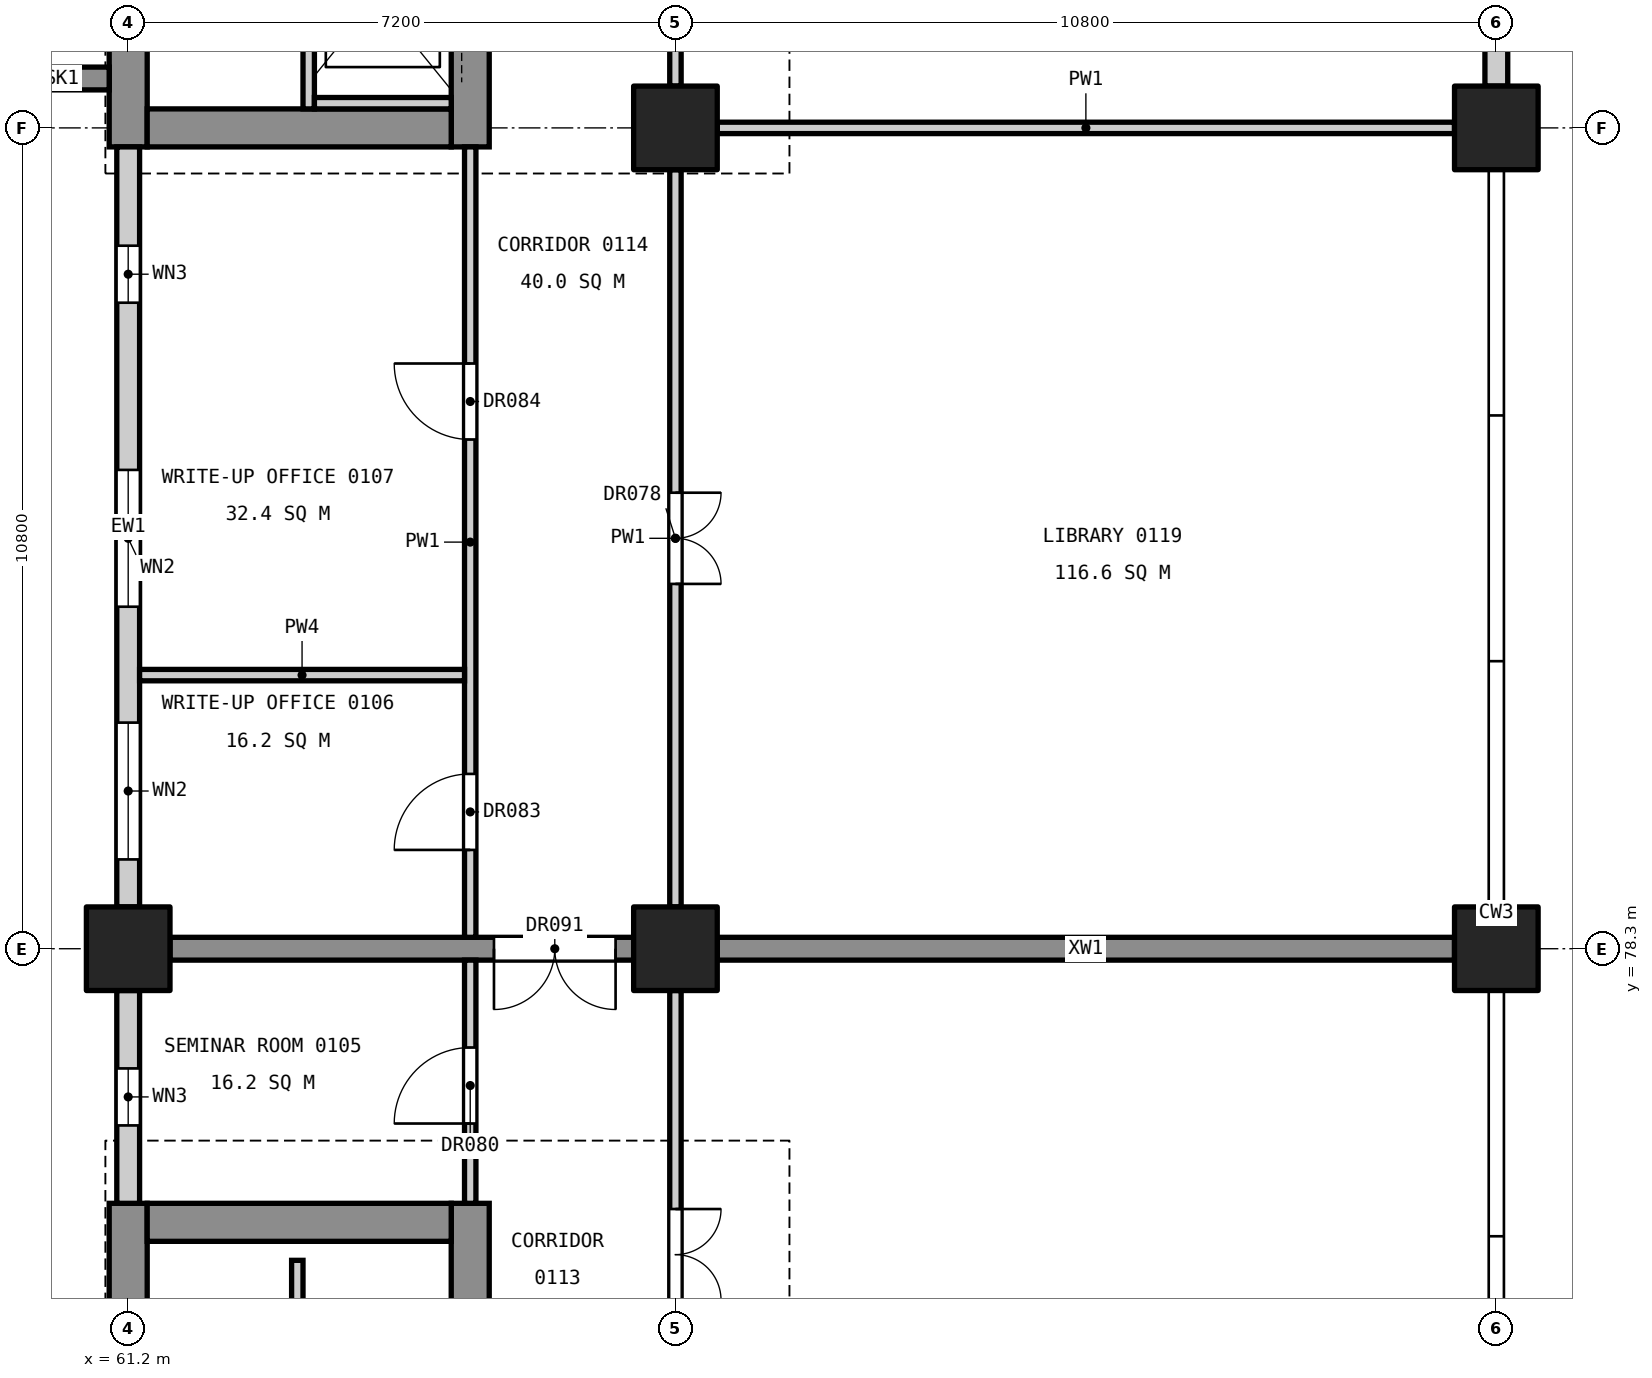
"""IFC4 building model, lengths in metres.
Left out: names, types, materials, properties, quantities, classifications, styles, units other than length and angle.
Written with IfcOpenShell. Run it as: python <this file> out.ifc"""

import sys

from ifc_helpers import new_model, si_unit, direction, frame, frame_2d, origin, origin_2d, place, context, subcontext, project, spatial, rectangle, extrude, element, fill, save


model = new_model("IFC4")
c1 = context("Model", 3, precision=1e-05, world=origin(), true_north=direction((0.0, 1.0)))
c2 = subcontext(c1, "Body", "Model", "MODEL_VIEW")
j1 = project(units=[si_unit("LENGTHUNIT", "METRE"), si_unit("PLANEANGLEUNIT", "RADIAN")], contexts=[c1])
p1 = place(None, origin())
s1 = spatial("IfcSite", under=j1, at=p1, CompositionType="ELEMENT")
p2 = place(p1, origin())
s2 = spatial("IfcBuilding", under=s1, at=p2, CompositionType="ELEMENT")
p3 = place(p2, frame((0.0, 0.0, 6.0)))
s3 = spatial("IfcBuildingStorey", under=s2, at=p3, CompositionType="ELEMENT", Elevation=6.0)
for number, where, z_axis, x_axis in (
    (1, (61.2, 78.3, 0.0), (0.0, 0.0, 1.0), (1.0, 0.0, 0.0)),
    (2, (68.4, 78.3, 0.0), (0.0, 0.0, 1.0), (1.0, 0.0, 0.0)),
    (3, (68.4, 89.1, 0.0), (0.0, 0.0, 1.0), (1.0, 0.0, 0.0)),
    (4, (79.2, 78.3, 0.0), (0.0, 0.0, 1.0), (1.0, 0.0, 0.0)),
    (5, (79.2, 89.1, 0.0), (0.0, 0.0, 1.0), (1.0, 0.0, 0.0)),
):
    element("IfcColumn", number, at=place(p3, frame(where, z_axis=z_axis, x_axis=x_axis)), inside=s3, PredefinedType="COLUMN", context=c2, shape_type="SweptSolid", body=[
        extrude(rectangle(XDim=1.1, YDim=1.1, at=origin_2d()), origin(), (0.0, 0.0, 1.0), 5.4),
    ])
p4 = place(p3, frame((61.2, 60.05, 0.0), z_axis=(0.0, 0.0, 1.0), x_axis=(0.0, 1.0, 0.0)))
e6 = element("IfcWall", 6, at=p4, inside=s3, PredefinedType="SHEAR", context=c2, shape_type="SweptSolid", body=[
    extrude(rectangle(XDim=14.9, YDim=0.5, at=frame_2d((7.45, 0.0))), origin(), (0.0, 0.0, 1.0), 5.1),
])
p5 = place(p4, frame((6.3, 0.0, 3.4)))
e7 = element("IfcOpeningElement", 7, at=p5, cuts=e6, PredefinedType="OPENING", context=c2, shape_type="SweptSolid", body=[
    extrude(rectangle(XDim=1.2, YDim=0.9, at=frame_2d((0.6, 0.45))), frame((0.0, 0.26, 0.0), z_axis=(0.0, -1.0, 0.0), x_axis=(1.0, 0.0, 0.0)), (0.0, 0.0, 1.0), 0.52),
])
p6 = place(p3, frame((65.7, 60.05, 0.0), z_axis=(0.0, 0.0, 1.0), x_axis=(0.0, 1.0, 0.0)))
e8 = element("IfcWall", 8, at=p6, inside=s3, PredefinedType="SHEAR", context=c2, shape_type="SweptSolid", body=[
    extrude(rectangle(XDim=14.9, YDim=0.5, at=frame_2d((7.45, 0.0))), origin(), (0.0, 0.0, 1.0), 5.1),
])
p7 = place(p6, frame((0.55, 0.0, 0.0)))
e9 = element("IfcOpeningElement", 9, at=p7, cuts=e8, PredefinedType="OPENING", context=c2, shape_type="SweptSolid", body=[
    extrude(rectangle(XDim=1.4, YDim=2.1, at=frame_2d((0.7, 1.05))), frame((0.0, 0.26, 0.0), z_axis=(0.0, -1.0, 0.0), x_axis=(1.0, 0.0, 0.0)), (0.0, 0.0, 1.0), 0.52),
])
p8 = place(p6, frame((8.85, 0.0, 0.0)))
e10 = element("IfcOpeningElement", 10, at=p8, cuts=e8, PredefinedType="OPENING", context=c2, shape_type="SweptSolid", body=[
    extrude(rectangle(XDim=1.1, YDim=2.1, at=frame_2d((0.55, 1.05))), frame((0.0, 0.26, 0.0), z_axis=(0.0, -1.0, 0.0), x_axis=(1.0, 0.0, 0.0)), (0.0, 0.0, 1.0), 0.52),
])
p9 = place(p6, frame((11.4, 0.0, 0.0)))
e11 = element("IfcOpeningElement", 11, at=p9, cuts=e8, PredefinedType="OPENING", context=c2, shape_type="SweptSolid", body=[
    extrude(rectangle(XDim=1.1, YDim=2.1, at=frame_2d((0.55, 1.05))), frame((0.0, 0.26, 0.0), z_axis=(0.0, -1.0, 0.0), x_axis=(1.0, 0.0, 0.0)), (0.0, 0.0, 1.0), 0.52),
])
p10 = place(p3, frame((61.45, 74.7, 0.0), z_axis=(0.0, 0.0, 1.0), x_axis=(1.0, 0.0, 0.0)))
e12 = element("IfcWall", 12, at=p10, inside=s3, PredefinedType="SHEAR", context=c2, shape_type="SweptSolid", body=[
    extrude(rectangle(XDim=4.0, YDim=0.5, at=frame_2d((2.0, 0.0))), origin(), (0.0, 0.0, 1.0), 5.1),
])
p11 = place(p3, frame((61.2, 88.85, 0.0), z_axis=(0.0, 0.0, 1.0), x_axis=(0.0, 1.0, 0.0)))
e13 = element("IfcWall", 13, at=p11, inside=s3, PredefinedType="SHEAR", context=c2, shape_type="SweptSolid", body=[
    extrude(rectangle(XDim=11.3, YDim=0.5, at=frame_2d((5.65, 0.0))), origin(), (0.0, 0.0, 1.0), 5.1),
])
p12 = place(p11, frame((3.8, 0.0, 3.4)))
e14 = element("IfcOpeningElement", 14, at=p12, cuts=e13, PredefinedType="OPENING", context=c2, shape_type="SweptSolid", body=[
    extrude(rectangle(XDim=1.2, YDim=0.9, at=frame_2d((0.6, 0.45))), frame((0.0, 0.26, 0.0), z_axis=(0.0, -1.0, 0.0), x_axis=(1.0, 0.0, 0.0)), (0.0, 0.0, 1.0), 0.52),
])
p13 = place(p3, frame((65.7, 88.85, 0.0), z_axis=(0.0, 0.0, 1.0), x_axis=(0.0, 1.0, 0.0)))
e15 = element("IfcWall", 15, at=p13, inside=s3, PredefinedType="SHEAR", context=c2, shape_type="SweptSolid", body=[
    extrude(rectangle(XDim=11.3, YDim=0.5, at=frame_2d((5.65, 0.0))), origin(), (0.0, 0.0, 1.0), 5.1),
])
p14 = place(p13, frame((9.35, 0.0, 0.0)))
e16 = element("IfcOpeningElement", 16, at=p14, cuts=e15, PredefinedType="OPENING", context=c2, shape_type="SweptSolid", body=[
    extrude(rectangle(XDim=1.4, YDim=2.1, at=frame_2d((0.7, 1.05))), frame((0.0, 0.26, 0.0), z_axis=(0.0, -1.0, 0.0), x_axis=(1.0, 0.0, 0.0)), (0.0, 0.0, 1.0), 0.52),
])
p15 = place(p13, frame((1.4, 0.0, 0.0)))
e17 = element("IfcOpeningElement", 17, at=p15, cuts=e15, PredefinedType="OPENING", context=c2, shape_type="SweptSolid", body=[
    extrude(rectangle(XDim=1.1, YDim=2.1, at=frame_2d((0.55, 1.05))), frame((0.0, 0.26, 0.0), z_axis=(0.0, -1.0, 0.0), x_axis=(1.0, 0.0, 0.0)), (0.0, 0.0, 1.0), 0.52),
])
p16 = place(p3, frame((61.45, 89.1, 0.0), z_axis=(0.0, 0.0, 1.0), x_axis=(1.0, 0.0, 0.0)))
e18 = element("IfcWall", 18, at=p16, inside=s3, PredefinedType="SHEAR", context=c2, shape_type="SweptSolid", body=[
    extrude(rectangle(XDim=4.0, YDim=0.5, at=frame_2d((2.0, 0.0))), origin(), (0.0, 0.0, 1.0), 5.1),
])
p17 = place(p3, frame((60.95, 89.75, 0.0), z_axis=(0.0, 0.0, 1.0), x_axis=(-1.0, 0.0, 0.0)))
e19 = element("IfcWall", 19, at=p17, inside=s3, PredefinedType="SHEAR", context=c2, shape_type="SweptSolid", body=[
    extrude(rectangle(XDim=1.25, YDim=0.3, at=frame_2d((0.625, 0.0))), origin(), (0.0, 0.0, 1.0), 5.4),
])
p18 = place(p3, frame((61.75, 78.3, 0.0), z_axis=(0.0, 0.0, 1.0), x_axis=(1.0, 0.0, 0.0)))
e20 = element("IfcWall", 20, at=p18, inside=s3, PredefinedType="SHEAR", context=c2, shape_type="SweptSolid", body=[
    extrude(rectangle(XDim=6.1, YDim=0.3, at=frame_2d((3.05, 0.0))), origin(), (0.0, 0.0, 1.0), 5.1),
])
p19 = place(p18, frame((4.262, 0.0, 0.0)))
e21 = element("IfcOpeningElement", 21, at=p19, cuts=e20, PredefinedType="OPENING", context=c2, shape_type="SweptSolid", body=[
    extrude(rectangle(XDim=1.6, YDim=2.1, at=frame_2d((0.8, 1.05))), frame((0.0, 0.16, 0.0), z_axis=(0.0, -1.0, 0.0), x_axis=(1.0, 0.0, 0.0)), (0.0, 0.0, 1.0), 0.32),
])
p20 = place(p3, frame((68.95, 78.3, 0.0), z_axis=(0.0, 0.0, 1.0), x_axis=(1.0, 0.0, 0.0)))
e22 = element("IfcWall", 22, at=p20, inside=s3, PredefinedType="SHEAR", context=c2, shape_type="SweptSolid", body=[
    extrude(rectangle(XDim=9.7, YDim=0.3, at=frame_2d((4.85, 0.0))), origin(), (0.0, 0.0, 1.0), 5.1),
])
p21 = place(p3, frame((63.575, 92.0, 0.0), z_axis=(0.0, 0.0, 1.0), x_axis=(0.0, -1.0, 0.0)))
e23 = element("IfcWall", 23, at=p21, inside=s3, PredefinedType="SOLIDWALL", context=c2, shape_type="SweptSolid", body=[
    extrude(rectangle(XDim=2.65, YDim=0.15, at=frame_2d((1.325, 0.0))), origin(), (0.0, 0.0, 1.0), 5.4),
])
p22 = place(p3, frame((63.65, 89.425, 0.0), z_axis=(0.0, 0.0, 1.0), x_axis=(1.0, 0.0, 0.0)))
e24 = element("IfcWall", 24, at=p22, inside=s3, PredefinedType="SOLIDWALL", context=c2, shape_type="SweptSolid", body=[
    extrude(rectangle(XDim=1.8, YDim=0.15, at=frame_2d((0.9, 0.0))), origin(), (0.0, 0.0, 1.0), 5.4),
])
p23 = place(p3, frame((63.425, 73.3, 0.0), z_axis=(0.0, 0.0, 1.0), x_axis=(0.0, 1.0, 0.0)))
e25 = element("IfcWall", 25, at=p23, inside=s3, PredefinedType="SOLIDWALL", context=c2, shape_type="SweptSolid", body=[
    extrude(rectangle(XDim=0.9, YDim=0.15, at=frame_2d((0.45, 0.0))), origin(), (0.0, 0.0, 1.0), 5.4),
])
p24 = place(p3, frame((61.2, 74.95, 0.0), z_axis=(0.0, 0.0, 1.0), x_axis=(0.0, 1.0, 0.0)))
e26 = element("IfcWall", 26, at=p24, inside=s3, PredefinedType="STANDARD", context=c2, shape_type="SweptSolid", body=[
    extrude(rectangle(XDim=2.8, YDim=0.3, at=frame_2d((1.4, 0.0))), origin(), (0.0, 0.0, 1.0), 4.1),
])
p25 = place(p24, frame((1.025, 0.0, 0.8)))
e27 = element("IfcOpeningElement", 27, at=p25, cuts=e26, PredefinedType="OPENING", context=c2, shape_type="SweptSolid", body=[
    extrude(rectangle(XDim=0.75, YDim=1.2, at=frame_2d((0.375, 0.6))), frame((0.0, 0.16, 0.0), z_axis=(0.0, -1.0, 0.0), x_axis=(1.0, 0.0, 0.0)), (0.0, 0.0, 1.0), 0.32),
])
p26 = place(p3, frame((61.2, 78.85, 0.0), z_axis=(0.0, 0.0, 1.0), x_axis=(0.0, 1.0, 0.0)))
e28 = element("IfcWall", 28, at=p26, inside=s3, PredefinedType="STANDARD", context=c2, shape_type="SweptSolid", body=[
    extrude(rectangle(XDim=10.0, YDim=0.3, at=frame_2d((5.0, 0.0))), origin(), (0.0, 0.0, 1.0), 4.1),
])
p27 = place(p26, frame((0.625, 0.0, 0.9)))
e29 = element("IfcOpeningElement", 29, at=p27, cuts=e28, PredefinedType="OPENING", context=c2, shape_type="SweptSolid", body=[
    extrude(rectangle(XDim=1.8, YDim=3.0, at=frame_2d((0.9, 1.5))), frame((0.0, 0.16, 0.0), z_axis=(0.0, -1.0, 0.0), x_axis=(1.0, 0.0, 0.0)), (0.0, 0.0, 1.0), 0.32),
])
p28 = place(p26, frame((3.95, 0.0, 0.9)))
e30 = element("IfcOpeningElement", 30, at=p28, cuts=e28, PredefinedType="OPENING", context=c2, shape_type="SweptSolid", body=[
    extrude(rectangle(XDim=1.8, YDim=3.0, at=frame_2d((0.9, 1.5))), frame((0.0, 0.16, 0.0), z_axis=(0.0, -1.0, 0.0), x_axis=(1.0, 0.0, 0.0)), (0.0, 0.0, 1.0), 0.32),
])
p29 = place(p26, frame((7.95, 0.0, 0.8)))
e31 = element("IfcOpeningElement", 31, at=p29, cuts=e28, PredefinedType="OPENING", context=c2, shape_type="SweptSolid", body=[
    extrude(rectangle(XDim=0.75, YDim=1.2, at=frame_2d((0.375, 0.6))), frame((0.0, 0.16, 0.0), z_axis=(0.0, -1.0, 0.0), x_axis=(1.0, 0.0, 0.0)), (0.0, 0.0, 1.0), 0.32),
])
p30 = place(p3, frame((79.2, 89.65, 0.0), z_axis=(0.0, 0.0, 1.0), x_axis=(0.0, 1.0, 0.0)))
e32 = element("IfcWall", 32, at=p30, inside=s3, PredefinedType="STANDARD", context=c2, shape_type="SweptSolid", body=[
    extrude(rectangle(XDim=9.7, YDim=0.3, at=frame_2d((4.85, 0.0))), origin(), (0.0, 0.0, 1.0), 4.0),
])
p31 = place(p3, frame((65.7, 74.95, 0.0), z_axis=(0.0, 0.0, 1.0), x_axis=(0.0, 1.0, 0.0)))
e33 = element("IfcWall", 33, at=p31, inside=s3, PredefinedType="PARTITIONING", context=c2, shape_type="SweptSolid", body=[
    extrude(rectangle(XDim=3.2, YDim=0.15, at=frame_2d((1.6, 0.0))), origin(), (0.0, 0.0, 1.0), 4.0),
])
p32 = place(p31, frame((1.05, 0.0, 0.0)))
e34 = element("IfcOpeningElement", 34, at=p32, cuts=e33, PredefinedType="OPENING", context=c2, shape_type="SweptSolid", body=[
    extrude(rectangle(XDim=1.0, YDim=2.1, at=frame_2d((0.5, 1.05))), frame((0.0, 0.085, 0.0), z_axis=(0.0, -1.0, 0.0), x_axis=(1.0, 0.0, 0.0)), (0.0, 0.0, 1.0), 0.17),
])
p33 = place(p3, frame((65.7, 78.45, 0.0), z_axis=(0.0, 0.0, 1.0), x_axis=(0.0, 1.0, 0.0)))
e35 = element("IfcWall", 35, at=p33, inside=s3, PredefinedType="PARTITIONING", context=c2, shape_type="SweptSolid", body=[
    extrude(rectangle(XDim=10.4, YDim=0.15, at=frame_2d((5.2, 0.0))), origin(), (0.0, 0.0, 1.0), 4.0),
])
p34 = place(p33, frame((1.15, 0.0, 0.0)))
e36 = element("IfcOpeningElement", 36, at=p34, cuts=e35, PredefinedType="OPENING", context=c2, shape_type="SweptSolid", body=[
    extrude(rectangle(XDim=1.0, YDim=2.1, at=frame_2d((0.5, 1.05))), frame((0.0, 0.085, 0.0), z_axis=(0.0, -1.0, 0.0), x_axis=(1.0, 0.0, 0.0)), (0.0, 0.0, 1.0), 0.17),
])
p35 = place(p33, frame((6.55, 0.0, 0.0)))
e37 = element("IfcOpeningElement", 37, at=p35, cuts=e35, PredefinedType="OPENING", context=c2, shape_type="SweptSolid", body=[
    extrude(rectangle(XDim=1.0, YDim=2.1, at=frame_2d((0.5, 1.05))), frame((0.0, 0.085, 0.0), z_axis=(0.0, -1.0, 0.0), x_axis=(1.0, 0.0, 0.0)), (0.0, 0.0, 1.0), 0.17),
])
p36 = place(p3, frame((61.35, 81.9, 0.0), z_axis=(0.0, 0.0, 1.0), x_axis=(1.0, 0.0, 0.0)))
e38 = element("IfcWall", 38, at=p36, inside=s3, PredefinedType="PARTITIONING", context=c2, shape_type="SweptSolid", body=[
    extrude(rectangle(XDim=4.275, YDim=0.15, at=frame_2d((2.137, 0.0))), origin(), (0.0, 0.0, 1.0), 4.3),
])
p37 = place(p3, frame((68.4, 70.8, 0.0), z_axis=(0.0, 0.0, 1.0), x_axis=(0.0, 1.0, 0.0)))
e39 = element("IfcWall", 39, at=p37, inside=s3, PredefinedType="PARTITIONING", context=c2, shape_type="SweptSolid", body=[
    extrude(rectangle(XDim=6.95, YDim=0.15, at=frame_2d((3.475, 0.0))), origin(), (0.0, 0.0, 1.0), 4.0),
])
p38 = place(p37, frame((2.875, 0.0, 0.0)))
e40 = element("IfcOpeningElement", 40, at=p38, cuts=e39, PredefinedType="OPENING", context=c2, shape_type="SweptSolid", body=[
    extrude(rectangle(XDim=1.2, YDim=2.1, at=frame_2d((0.6, 1.05))), frame((0.0, 0.085, 0.0), z_axis=(0.0, -1.0, 0.0), x_axis=(1.0, 0.0, 0.0)), (0.0, 0.0, 1.0), 0.17),
])
p39 = place(p3, frame((68.4, 78.85, 0.0), z_axis=(0.0, 0.0, 1.0), x_axis=(0.0, 1.0, 0.0)))
e41 = element("IfcWall", 41, at=p39, inside=s3, PredefinedType="PARTITIONING", context=c2, shape_type="SweptSolid", body=[
    extrude(rectangle(XDim=9.7, YDim=0.15, at=frame_2d((4.85, 0.0))), origin(), (0.0, 0.0, 1.0), 4.0),
])
p40 = place(p39, frame((4.25, 0.0, 0.0)))
e42 = element("IfcOpeningElement", 42, at=p40, cuts=e41, PredefinedType="OPENING", context=c2, shape_type="SweptSolid", body=[
    extrude(rectangle(XDim=1.2, YDim=2.1, at=frame_2d((0.6, 1.05))), frame((0.0, 0.085, 0.0), z_axis=(0.0, -1.0, 0.0), x_axis=(1.0, 0.0, 0.0)), (0.0, 0.0, 1.0), 0.17),
])
p41 = place(p3, frame((68.4, 89.65, 0.0), z_axis=(0.0, 0.0, 1.0), x_axis=(0.0, 1.0, 0.0)))
e43 = element("IfcWall", 43, at=p41, inside=s3, PredefinedType="PARTITIONING", context=c2, shape_type="SweptSolid", body=[
    extrude(rectangle(XDim=3.45, YDim=0.15, at=frame_2d((1.725, 0.0))), origin(), (0.0, 0.0, 1.0), 4.0),
])
p42 = place(p41, frame((1.125, 0.0, 0.0)))
e44 = element("IfcOpeningElement", 44, at=p42, cuts=e43, PredefinedType="OPENING", context=c2, shape_type="SweptSolid", body=[
    extrude(rectangle(XDim=1.2, YDim=2.1, at=frame_2d((0.6, 1.05))), frame((0.0, 0.085, 0.0), z_axis=(0.0, -1.0, 0.0), x_axis=(1.0, 0.0, 0.0)), (0.0, 0.0, 1.0), 0.17),
])
p43 = place(p3, frame((68.95, 89.1, 0.0), z_axis=(0.0, 0.0, 1.0), x_axis=(1.0, 0.0, 0.0)))
e45 = element("IfcWall", 45, at=p43, inside=s3, PredefinedType="PARTITIONING", context=c2, shape_type="SweptSolid", body=[
    extrude(rectangle(XDim=9.7, YDim=0.15, at=frame_2d((4.85, 0.0))), origin(), (0.0, 0.0, 1.0), 4.3),
])
p44 = place(p25, origin())
e46 = element("IfcWindow", 46, at=p44, inside=s3, PartitioningType="SINGLE_PANEL", PredefinedType="WINDOW", context=c2, shape_type="SweptSolid", body=[
    extrude(rectangle(XDim=0.75, YDim=1.2, at=frame_2d((0.375, 0.6))), frame((0.0, 0.03, 0.0), z_axis=(0.0, -1.0, 0.0), x_axis=(1.0, 0.0, 0.0)), (0.0, 0.0, 1.0), 0.06),
])
fill(e27, e46)
p45 = place(p27, origin())
e47 = element("IfcWindow", 47, at=p45, inside=s3, PartitioningType="SINGLE_PANEL", PredefinedType="WINDOW", context=c2, shape_type="SweptSolid", body=[
    extrude(rectangle(XDim=1.8, YDim=3.0, at=frame_2d((0.9, 1.5))), frame((0.0, 0.03, 0.0), z_axis=(0.0, -1.0, 0.0), x_axis=(1.0, 0.0, 0.0)), (0.0, 0.0, 1.0), 0.06),
])
fill(e29, e47)
p46 = place(p28, origin())
e48 = element("IfcWindow", 48, at=p46, inside=s3, PartitioningType="SINGLE_PANEL", PredefinedType="WINDOW", context=c2, shape_type="SweptSolid", body=[
    extrude(rectangle(XDim=1.8, YDim=3.0, at=frame_2d((0.9, 1.5))), frame((0.0, 0.03, 0.0), z_axis=(0.0, -1.0, 0.0), x_axis=(1.0, 0.0, 0.0)), (0.0, 0.0, 1.0), 0.06),
])
fill(e30, e48)
p47 = place(p29, origin())
e49 = element("IfcWindow", 49, at=p47, inside=s3, PartitioningType="SINGLE_PANEL", PredefinedType="WINDOW", context=c2, shape_type="SweptSolid", body=[
    extrude(rectangle(XDim=0.75, YDim=1.2, at=frame_2d((0.375, 0.6))), frame((0.0, 0.03, 0.0), z_axis=(0.0, -1.0, 0.0), x_axis=(1.0, 0.0, 0.0)), (0.0, 0.0, 1.0), 0.06),
])
fill(e31, e49)
p48 = place(p38, frame((1.2, 0.0, 0.0), z_axis=(0.0, 0.0, 1.0), x_axis=(-1.0, 0.0, 0.0)))
e50 = element("IfcDoor", 50, at=p48, inside=s3, OperationType="DOUBLE_DOOR_SINGLE_SWING", PredefinedType="DOOR", context=c2, shape_type="SweptSolid", body=[
    extrude(rectangle(XDim=1.2, YDim=2.1, at=frame_2d((0.6, 1.05))), frame((0.0, 0.025, 0.0), z_axis=(0.0, -1.0, 0.0), x_axis=(1.0, 0.0, 0.0)), (0.0, 0.0, 1.0), 0.05),
])
fill(e40, e50)
p49 = place(p40, frame((1.2, 0.0, 0.0), z_axis=(0.0, 0.0, 1.0), x_axis=(-1.0, 0.0, 0.0)))
e51 = element("IfcDoor", 51, at=p49, inside=s3, OperationType="DOUBLE_DOOR_SINGLE_SWING", PredefinedType="DOOR", context=c2, shape_type="SweptSolid", body=[
    extrude(rectangle(XDim=1.2, YDim=2.1, at=frame_2d((0.6, 1.05))), frame((0.0, 0.025, 0.0), z_axis=(0.0, -1.0, 0.0), x_axis=(1.0, 0.0, 0.0)), (0.0, 0.0, 1.0), 0.05),
])
fill(e42, e51)
p50 = place(p32, origin())
e52 = element("IfcDoor", 52, at=p50, inside=s3, OperationType="SINGLE_SWING_LEFT", PredefinedType="DOOR", context=c2, shape_type="SweptSolid", body=[
    extrude(rectangle(XDim=1.0, YDim=2.1, at=frame_2d((0.5, 1.05))), frame((0.0, 0.025, 0.0), z_axis=(0.0, -1.0, 0.0), x_axis=(1.0, 0.0, 0.0)), (0.0, 0.0, 1.0), 0.05),
])
fill(e34, e52)
p51 = place(p34, origin())
e53 = element("IfcDoor", 53, at=p51, inside=s3, OperationType="SINGLE_SWING_LEFT", PredefinedType="DOOR", context=c2, shape_type="SweptSolid", body=[
    extrude(rectangle(XDim=1.0, YDim=2.1, at=frame_2d((0.5, 1.05))), frame((0.0, 0.025, 0.0), z_axis=(0.0, -1.0, 0.0), x_axis=(1.0, 0.0, 0.0)), (0.0, 0.0, 1.0), 0.05),
])
fill(e36, e53)
p52 = place(p35, origin())
e54 = element("IfcDoor", 54, at=p52, inside=s3, OperationType="SINGLE_SWING_RIGHT", PredefinedType="DOOR", context=c2, shape_type="SweptSolid", body=[
    extrude(rectangle(XDim=1.0, YDim=2.1, at=frame_2d((0.5, 1.05))), frame((0.0, 0.025, 0.0), z_axis=(0.0, -1.0, 0.0), x_axis=(1.0, 0.0, 0.0)), (0.0, 0.0, 1.0), 0.05),
])
fill(e37, e54)
p53 = place(p19, frame((1.6, 0.0, 0.0), z_axis=(0.0, 0.0, 1.0), x_axis=(-1.0, 0.0, 0.0)))
e55 = element("IfcDoor", 55, at=p53, inside=s3, OperationType="DOUBLE_DOOR_SINGLE_SWING", PredefinedType="DOOR", context=c2, shape_type="SweptSolid", body=[
    extrude(rectangle(XDim=1.6, YDim=2.1, at=frame_2d((0.8, 1.05))), frame((0.0, 0.025, 0.0), z_axis=(0.0, -1.0, 0.0), x_axis=(1.0, 0.0, 0.0)), (0.0, 0.0, 1.0), 0.05),
])
fill(e21, e55)
save(model, sys.argv[1])
